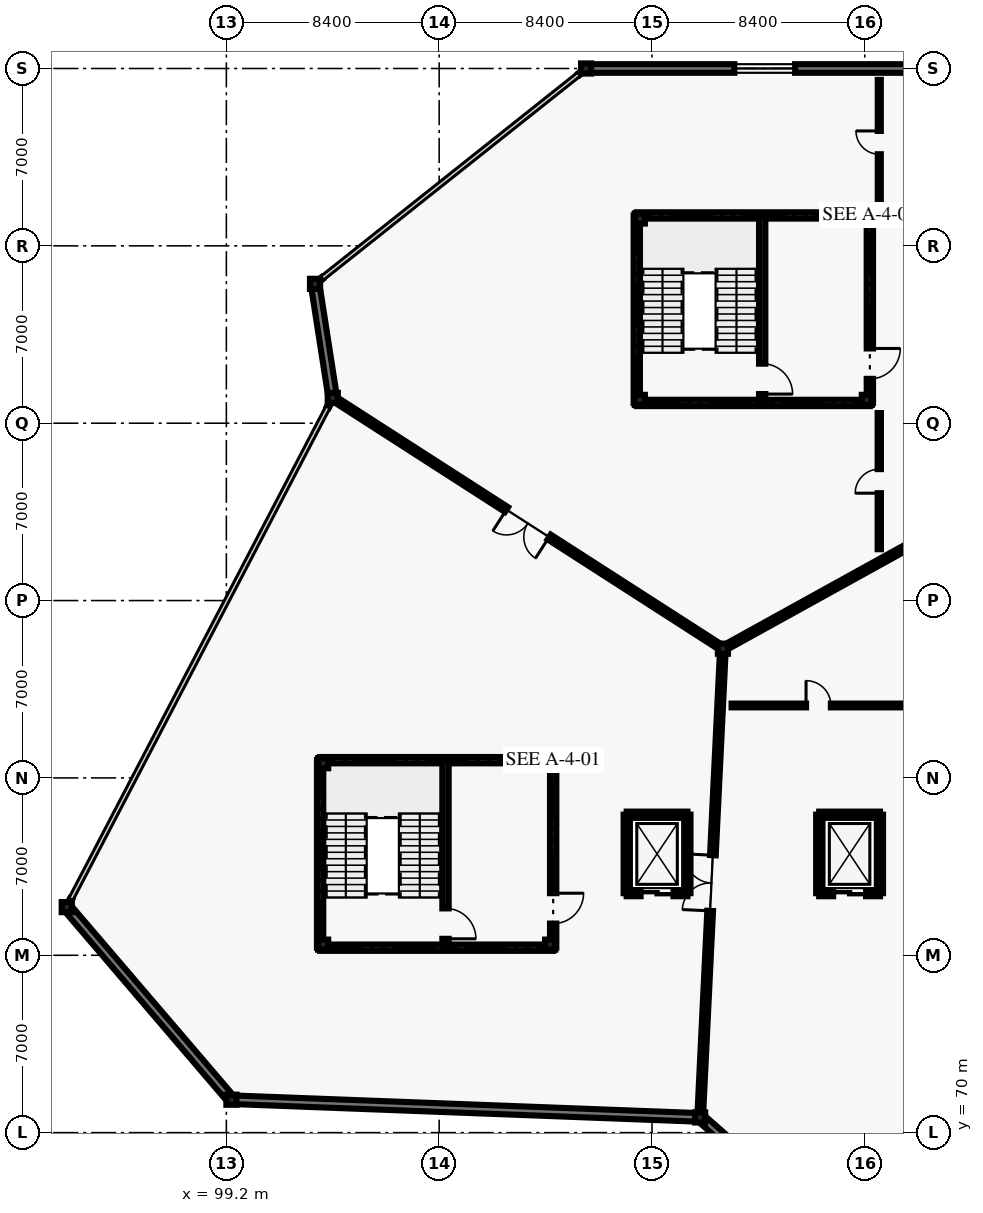
"""IFC4 building model, lengths in metres.
Left out: names, types, materials, properties, quantities, classifications, styles, units other than length and angle.
Written with IfcOpenShell. Run it as: python <this file> out.ifc"""

import sys

from ifc_helpers import new_model, si_unit, direction, frame, frame_2d, origin, origin_2d, place, context, subcontext, project, spatial, rectangle, i_section, extrude, element, fill, save


model = new_model("IFC4")
c1 = context("Model", 3, precision=1e-05, world=origin(), true_north=direction((0.0, 1.0)))
c2 = subcontext(c1, "Body", "Model", "MODEL_VIEW")
j1 = project(units=[si_unit("LENGTHUNIT", "METRE"), si_unit("PLANEANGLEUNIT", "RADIAN")], contexts=[c1])
p1 = place(None, origin())
s1 = spatial("IfcSite", under=j1, at=p1, CompositionType="ELEMENT")
p2 = place(p1, origin())
s2 = spatial("IfcBuilding", under=s1, at=p2, CompositionType="ELEMENT")
p3 = place(p2, frame((0.0, 0.0, 5.4)))
s3 = spatial("IfcBuildingStorey", under=s2, at=p3, CompositionType="ELEMENT", Elevation=5.4)
for number, where, z_axis, x_axis in (
    (1, (92.9, 78.9, 0.0), (0.0, 0.0, 1.0), (1.0, 0.0, 0.0)),
    (2, (99.4, 71.3, 0.0), (0.0, 0.0, 1.0), (1.0, 0.0, 0.0)),
    (3, (102.7, 103.5, 0.0), (0.0, 0.0, 1.0), (1.0, 0.0, 0.0)),
    (4, (103.4, 99.0, 0.0), (0.0, 0.0, 1.0), (1.0, 0.0, 0.0)),
    (5, (113.4, 112.0, 0.0), (0.0, 0.0, 1.0), (1.0, 0.0, 0.0)),
    (6, (117.9, 70.6, 0.0), (0.0, 0.0, 1.0), (1.0, 0.0, 0.0)),
    (7, (118.8, 89.1, 0.0), (0.0, 0.0, 1.0), (1.0, 0.0, 0.0)),
    (8, (103.02, 77.42, 0.0), (0.0, 0.0, 1.0), (1.0, 0.0, 0.0)),
    (9, (111.98, 77.42, 0.0), (0.0, 0.0, 1.0), (1.0, 0.0, 0.0)),
    (10, (111.98, 84.58, 0.0), (0.0, 0.0, 1.0), (1.0, 0.0, 0.0)),
    (11, (103.02, 84.58, 0.0), (0.0, 0.0, 1.0), (1.0, 0.0, 0.0)),
    (12, (115.52, 98.92, 0.0), (0.0, 0.0, 1.0), (1.0, 0.0, 0.0)),
    (13, (124.48, 98.92, 0.0), (0.0, 0.0, 1.0), (1.0, 0.0, 0.0)),
    (14, (124.48, 106.08, 0.0), (0.0, 0.0, 1.0), (1.0, 0.0, 0.0)),
    (15, (115.52, 106.08, 0.0), (0.0, 0.0, 1.0), (1.0, 0.0, 0.0)),
):
    element("IfcColumn", number, at=place(p3, frame(where, z_axis=z_axis, x_axis=x_axis)), inside=s3, PredefinedType="COLUMN", context=c2, shape_type="SweptSolid", body=[
        extrude(i_section(OverallWidth=0.4, OverallDepth=0.4, WebThickness=0.022, FlangeThickness=0.036, at=origin_2d()), origin(), (0.0, 0.0, 1.0), 4.8),
    ])
p4 = place(p3, frame((117.84, 70.602, 0.0), z_axis=(0.0, 0.0, 1.0), x_axis=(-0.999284381651, 0.037824920194, 0.0)))
e16 = element("IfcWall", 16, at=p4, inside=s3, PredefinedType="SOLIDWALL", context=c2, shape_type="SweptSolid", body=[
    extrude(rectangle(XDim=18.453, YDim=0.34, at=frame_2d((9.227, 0.0))), origin(), (0.0, 0.0, 1.0), 3.62),
])
for number, where, z_axis, x_axis in (
    (17, (92.919, 78.937, 0.0), (0.0, 0.0, 1.0), (0.464, 0.886, 0.0)),
    (18, (103.21, 98.637, 0.0), (0.0, 0.0, 1.0), (0.464, 0.886, 0.0)),
):
    element("IfcWall", number, at=place(p3, frame(where, z_axis=z_axis, x_axis=x_axis)), inside=s3, PredefinedType="SOLIDWALL", context=c2, shape_type="SweptSolid", body=[
        extrude(rectangle(XDim=0.308, YDim=0.095, at=frame_2d((0.154, 0.0))), origin(), (0.0, 0.0, 1.0), 3.62),
    ])
p5 = place(p3, frame((99.4, 71.3, 0.0), z_axis=(0.0, 0.0, 1.0), x_axis=(-0.649974737731, 0.75995581471, 0.0)))
e19 = element("IfcWall", 19, at=p5, inside=s3, PredefinedType="SOLIDWALL", context=c2, shape_type="SweptSolid", body=[
    extrude(rectangle(XDim=10.0, YDim=0.34, at=frame_2d((5.0, 0.0))), origin(), (0.0, 0.0, 1.0), 3.62),
])
p6 = place(p3, frame((125.5, 63.9, 0.0), z_axis=(0.0, 0.0, 1.0), x_axis=(-0.750131359252, 0.661288850554, 0.0)))
e20 = element("IfcWall", 20, at=p6, inside=s3, PredefinedType="SOLIDWALL", context=c2, shape_type="SweptSolid", body=[
    extrude(rectangle(XDim=10.072, YDim=0.34, at=frame_2d((5.036, 0.0))), origin(), (0.0, 0.0, 1.0), 3.62),
])
p7 = place(p3, frame((113.4, 112.0, 0.0), z_axis=(0.0, 0.0, 1.0), x_axis=(1.0, 0.0, 0.0)))
e21 = element("IfcWall", 21, at=p7, inside=s3, PredefinedType="SOLIDWALL", context=c2, shape_type="SweptSolid", body=[
    extrude(rectangle(XDim=14.1, YDim=0.34, at=frame_2d((7.05, 0.0))), origin(), (0.0, 0.0, 1.0), 3.62),
])
p8 = place(p7, frame((5.85, 0.0, 0.95)))
e22 = element("IfcOpeningElement", 22, at=p8, cuts=e21, PredefinedType="OPENING", context=c2, shape_type="SweptSolid", body=[
    extrude(rectangle(XDim=2.4, YDim=1.8, at=frame_2d((1.2, 0.9))), frame((0.0, 0.18, 0.0), z_axis=(0.0, -1.0, 0.0), x_axis=(1.0, 0.0, 0.0)), (0.0, 0.0, 1.0), 0.36),
])
p9 = place(p3, frame((102.733, 103.526, 0.0), z_axis=(0.0, 0.0, 1.0), x_axis=(0.782180115256, 0.623052379257, 0.0)))
e23 = element("IfcWall", 23, at=p9, inside=s3, PredefinedType="SOLIDWALL", context=c2, shape_type="SweptSolid", body=[
    extrude(rectangle(XDim=0.308, YDim=0.095, at=frame_2d((0.154, 0.0))), origin(), (0.0, 0.0, 1.0), 3.62),
])
p10 = place(p3, frame((113.126, 111.782, 0.0), z_axis=(0.0, 0.0, 1.0), x_axis=(0.781872503851, 0.6234383592, 0.0)))
e24 = element("IfcWall", 24, at=p10, inside=s3, PredefinedType="SOLIDWALL", context=c2, shape_type="SweptSolid", body=[
    extrude(rectangle(XDim=0.308, YDim=0.095, at=frame_2d((0.154, 0.0))), origin(), (0.0, 0.0, 1.0), 3.62),
])
p11 = place(p3, frame((103.391, 99.059, 0.0), z_axis=(0.0, 0.0, 1.0), x_axis=(-0.153783616147, 0.988104548823, 0.0)))
e25 = element("IfcWall", 25, at=p11, inside=s3, PredefinedType="SOLIDWALL", context=c2, shape_type="SweptSolid", body=[
    extrude(rectangle(XDim=4.494, YDim=0.34, at=frame_2d((2.247, 0.0))), origin(), (0.0, 0.0, 1.0), 3.62),
])
p12 = place(p3, frame((117.9, 70.6, 0.0), z_axis=(0.0, 0.0, 1.0), x_axis=(0.048599072515, 0.998818366947, 0.0)))
e26 = element("IfcWall", 26, at=p12, inside=s3, PredefinedType="SOLIDWALL", context=c2, shape_type="SweptSolid", body=[
    extrude(rectangle(XDim=18.522, YDim=0.225, at=frame_2d((9.261, 0.0))), origin(), (0.0, 0.0, 1.0), 4.02),
])
p13 = place(p12, frame((8.161, 0.0, 0.0)))
e27 = element("IfcOpeningElement", 27, at=p13, cuts=e26, PredefinedType="OPENING", context=c2, shape_type="SweptSolid", body=[
    extrude(rectangle(XDim=2.2, YDim=2.6, at=frame_2d((1.1, 1.3))), frame((0.0, 0.123, 0.0), z_axis=(0.0, -1.0, 0.0), x_axis=(1.0, 0.0, 0.0)), (0.0, 0.0, 1.0), 0.245),
])
p14 = place(p3, frame((118.8, 89.1, 0.0), z_axis=(0.0, 0.0, 1.0), x_axis=(-0.841183241423, 0.540750177392, 0.0)))
e28 = element("IfcWall", 28, at=p14, inside=s3, PredefinedType="SOLIDWALL", context=c2, shape_type="SweptSolid", body=[
    extrude(rectangle(XDim=18.308, YDim=0.225, at=frame_2d((9.154, 0.0))), origin(), (0.0, 0.0, 1.0), 4.02),
])
p15 = place(p14, frame((8.154, 0.0, 0.0)))
e29 = element("IfcOpeningElement", 29, at=p15, cuts=e28, PredefinedType="OPENING", context=c2, shape_type="SweptSolid", body=[
    extrude(rectangle(XDim=2.0, YDim=2.5, at=frame_2d((1.0, 1.25))), frame((0.0, 0.123, 0.0), z_axis=(0.0, -1.0, 0.0), x_axis=(1.0, 0.0, 0.0)), (0.0, 0.0, 1.0), 0.245),
])
p16 = place(p3, frame((134.9, 98.0, 0.0), z_axis=(0.0, 0.0, 1.0), x_axis=(-0.875181353329, -0.483794996652, 0.0)))
e30 = element("IfcWall", 30, at=p16, inside=s3, PredefinedType="SOLIDWALL", context=c2, shape_type="SweptSolid", body=[
    extrude(rectangle(XDim=18.396, YDim=0.225, at=frame_2d((9.198, 0.0))), origin(), (0.0, 0.0, 1.0), 4.02),
])
p17 = place(p16, frame((8.273, 0.0, 0.0)))
e31 = element("IfcOpeningElement", 31, at=p17, cuts=e30, PredefinedType="OPENING", context=c2, shape_type="SweptSolid", body=[
    extrude(rectangle(XDim=1.85, YDim=2.4, at=frame_2d((0.925, 1.2))), frame((0.0, 0.123, 0.0), z_axis=(0.0, -1.0, 0.0), x_axis=(1.0, 0.0, 0.0)), (0.0, 0.0, 1.0), 0.245),
])
p18 = place(p3, frame((119.142, 86.859, 0.0), z_axis=(0.0, 0.0, 1.0), x_axis=(1.0, 0.0, 0.0)))
e32 = element("IfcWall", 32, at=p18, inside=s3, PredefinedType="PARTITIONING", context=c2, shape_type="SweptSolid", body=[
    extrude(rectangle(XDim=6.858, YDim=0.15, at=frame_2d((3.429, 0.0))), origin(), (0.0, 0.0, 1.0), 3.32),
])
p19 = place(p18, frame((2.939, 0.0, 0.0)))
e33 = element("IfcOpeningElement", 33, at=p19, cuts=e32, PredefinedType="OPENING", context=c2, shape_type="SweptSolid", body=[
    extrude(rectangle(XDim=0.98, YDim=2.15, at=frame_2d((0.49, 1.075))), frame((0.0, 0.085, 0.0), z_axis=(0.0, -1.0, 0.0), x_axis=(1.0, 0.0, 0.0)), (0.0, 0.0, 1.0), 0.17),
])
p20 = place(p3, frame((124.972, 93.026, 0.0), z_axis=(0.0, 0.0, 1.0), x_axis=(0.0, 1.0, 0.0)))
e34 = element("IfcWall", 34, at=p20, inside=s3, PredefinedType="PARTITIONING", context=c2, shape_type="SweptSolid", body=[
    extrude(rectangle(XDim=5.374, YDim=0.13, at=frame_2d((2.687, 0.0))), origin(), (0.0, 0.0, 1.0), 3.32),
])
p21 = place(p20, frame((2.212, 0.0, 0.0)))
e35 = element("IfcOpeningElement", 35, at=p21, cuts=e34, PredefinedType="OPENING", context=c2, shape_type="SweptSolid", body=[
    extrude(rectangle(XDim=0.95, YDim=2.15, at=frame_2d((0.475, 1.075))), frame((0.0, 0.075, 0.0), z_axis=(0.0, -1.0, 0.0), x_axis=(1.0, 0.0, 0.0)), (0.0, 0.0, 1.0), 0.15),
])
p22 = place(p3, frame((124.972, 106.6, 0.0), z_axis=(0.0, 0.0, 1.0), x_axis=(0.0, 1.0, 0.0)))
e36 = element("IfcWall", 36, at=p22, inside=s3, PredefinedType="PARTITIONING", context=c2, shape_type="SweptSolid", body=[
    extrude(rectangle(XDim=4.95, YDim=0.12, at=frame_2d((2.475, 0.0))), origin(), (0.0, 0.0, 1.0), 3.32),
])
p23 = place(p22, frame((2.015, 0.0, 0.0)))
e37 = element("IfcOpeningElement", 37, at=p23, cuts=e36, PredefinedType="OPENING", context=c2, shape_type="SweptSolid", body=[
    extrude(rectangle(XDim=0.92, YDim=2.1, at=frame_2d((0.46, 1.05))), frame((0.0, 0.07, 0.0), z_axis=(0.0, -1.0, 0.0), x_axis=(1.0, 0.0, 0.0)), (0.0, 0.0, 1.0), 0.14),
])
p24 = place(p3, frame((102.9, 77.3, 0.0), z_axis=(0.0, 0.0, 1.0), x_axis=(0.0, 1.0, 0.0)))
e38 = element("IfcWall", 38, at=p24, inside=s3, PredefinedType="SHEAR", context=c2, shape_type="SweptSolid", body=[
    extrude(rectangle(XDim=7.4, YDim=0.25, at=frame_2d((3.7, 0.0))), origin(), (0.0, 0.0, 1.0), 4.56),
])
for number, where, z_axis, x_axis in (
    (39, (102.9, 84.7, 0.0), (0.0, 0.0, 1.0), (1.0, 0.0, 0.0)),
    (40, (112.1, 77.3, 0.0), (0.0, 0.0, 1.0), (-1.0, 0.0, 0.0)),
):
    element("IfcWall", number, at=place(p3, frame(where, z_axis=z_axis, x_axis=x_axis)), inside=s3, PredefinedType="SHEAR", context=c2, shape_type="SweptSolid", body=[
        extrude(rectangle(XDim=9.2, YDim=0.25, at=frame_2d((4.6, 0.0))), origin(), (0.0, 0.0, 1.0), 4.56),
    ])
p25 = place(p3, frame((112.1, 84.7, 0.0), z_axis=(0.0, 0.0, 1.0), x_axis=(0.0, -1.0, 0.0)))
e41 = element("IfcWall", 41, at=p25, inside=s3, PredefinedType="SHEAR", context=c2, shape_type="SweptSolid", body=[
    extrude(rectangle(XDim=7.4, YDim=0.25, at=frame_2d((3.7, 0.0))), origin(), (0.0, 0.0, 1.0), 4.56),
])
p26 = place(p25, frame((5.25, 0.0, 0.0)))
e42 = element("IfcOpeningElement", 42, at=p26, cuts=e41, PredefinedType="OPENING", context=c2, shape_type="SweptSolid", body=[
    extrude(rectangle(XDim=1.2, YDim=2.2, at=frame_2d((0.6, 1.1))), frame((0.0, 0.135, 0.0), z_axis=(0.0, -1.0, 0.0), x_axis=(1.0, 0.0, 0.0)), (0.0, 0.0, 1.0), 0.27),
])
p27 = place(p3, frame((107.85, 84.7, 0.0), z_axis=(0.0, 0.0, 1.0), x_axis=(0.0, -1.0, 0.0)))
e43 = element("IfcWall", 43, at=p27, inside=s3, PredefinedType="SHEAR", context=c2, shape_type="SweptSolid", body=[
    extrude(rectangle(XDim=7.4, YDim=0.25, at=frame_2d((3.7, 0.0))), origin(), (0.0, 0.0, 1.0), 4.56),
])
p28 = place(p27, frame((5.85, 0.0, 0.0)))
e44 = element("IfcOpeningElement", 44, at=p28, cuts=e43, PredefinedType="OPENING", context=c2, shape_type="SweptSolid", body=[
    extrude(rectangle(XDim=1.2, YDim=2.2, at=frame_2d((0.6, 1.1))), frame((0.0, 0.135, 0.0), z_axis=(0.0, -1.0, 0.0), x_axis=(1.0, 0.0, 0.0)), (0.0, 0.0, 1.0), 0.27),
])
p29 = place(p3, frame((115.4, 98.8, 0.0), z_axis=(0.0, 0.0, 1.0), x_axis=(0.0, 1.0, 0.0)))
e45 = element("IfcWall", 45, at=p29, inside=s3, PredefinedType="SHEAR", context=c2, shape_type="SweptSolid", body=[
    extrude(rectangle(XDim=7.4, YDim=0.25, at=frame_2d((3.7, 0.0))), origin(), (0.0, 0.0, 1.0), 4.56),
])
for number, where, z_axis, x_axis in (
    (46, (115.4, 106.2, 0.0), (0.0, 0.0, 1.0), (1.0, 0.0, 0.0)),
    (47, (124.6, 98.8, 0.0), (0.0, 0.0, 1.0), (-1.0, 0.0, 0.0)),
):
    element("IfcWall", number, at=place(p3, frame(where, z_axis=z_axis, x_axis=x_axis)), inside=s3, PredefinedType="SHEAR", context=c2, shape_type="SweptSolid", body=[
        extrude(rectangle(XDim=9.2, YDim=0.25, at=frame_2d((4.6, 0.0))), origin(), (0.0, 0.0, 1.0), 4.56),
    ])
p30 = place(p3, frame((124.6, 106.2, 0.0), z_axis=(0.0, 0.0, 1.0), x_axis=(0.0, -1.0, 0.0)))
e48 = element("IfcWall", 48, at=p30, inside=s3, PredefinedType="SHEAR", context=c2, shape_type="SweptSolid", body=[
    extrude(rectangle(XDim=7.4, YDim=0.25, at=frame_2d((3.7, 0.0))), origin(), (0.0, 0.0, 1.0), 4.56),
])
p31 = place(p30, frame((5.25, 0.0, 0.0)))
e49 = element("IfcOpeningElement", 49, at=p31, cuts=e48, PredefinedType="OPENING", context=c2, shape_type="SweptSolid", body=[
    extrude(rectangle(XDim=1.2, YDim=2.2, at=frame_2d((0.6, 1.1))), frame((0.0, 0.135, 0.0), z_axis=(0.0, -1.0, 0.0), x_axis=(1.0, 0.0, 0.0)), (0.0, 0.0, 1.0), 0.27),
])
p32 = place(p3, frame((120.35, 106.2, 0.0), z_axis=(0.0, 0.0, 1.0), x_axis=(0.0, -1.0, 0.0)))
e50 = element("IfcWall", 50, at=p32, inside=s3, PredefinedType="SHEAR", context=c2, shape_type="SweptSolid", body=[
    extrude(rectangle(XDim=7.4, YDim=0.25, at=frame_2d((3.7, 0.0))), origin(), (0.0, 0.0, 1.0), 4.56),
])
p33 = place(p32, frame((5.85, 0.0, 0.0)))
e51 = element("IfcOpeningElement", 51, at=p33, cuts=e50, PredefinedType="OPENING", context=c2, shape_type="SweptSolid", body=[
    extrude(rectangle(XDim=1.2, YDim=2.2, at=frame_2d((0.6, 1.1))), frame((0.0, 0.135, 0.0), z_axis=(0.0, -1.0, 0.0), x_axis=(1.0, 0.0, 0.0)), (0.0, 0.0, 1.0), 0.27),
])
p34 = place(p3, frame((115.0, 82.55, 0.0), z_axis=(0.0, 0.0, 1.0), x_axis=(1.0, 0.0, 0.0)))
e52 = element("IfcWall", 52, at=p34, inside=s3, PredefinedType="SHEAR", context=c2, shape_type="SweptSolid", body=[
    extrude(rectangle(XDim=2.4, YDim=0.24, at=frame_2d((1.2, 0.0))), origin(), (0.0, 0.0, 1.0), 4.56),
])
for number, where, z_axis, x_axis in (
    (53, (117.4, 82.55, 0.0), (0.0, 0.0, 1.0), (0.0, -1.0, 0.0)),
    (54, (115.0, 79.45, 0.0), (0.0, 0.0, 1.0), (0.0, 1.0, 0.0)),
):
    element("IfcWall", number, at=place(p3, frame(where, z_axis=z_axis, x_axis=x_axis)), inside=s3, PredefinedType="SHEAR", context=c2, shape_type="SweptSolid", body=[
        extrude(rectangle(XDim=3.1, YDim=0.24, at=frame_2d((1.55, 0.0))), origin(), (0.0, 0.0, 1.0), 4.56),
    ])
p35 = place(p3, frame((117.4, 79.45, 0.0), z_axis=(0.0, 0.0, 1.0), x_axis=(-1.0, 0.0, 0.0)))
e55 = element("IfcWall", 55, at=p35, inside=s3, PredefinedType="SHEAR", context=c2, shape_type="SweptSolid", body=[
    extrude(rectangle(XDim=2.4, YDim=0.24, at=frame_2d((1.2, 0.0))), origin(), (0.0, 0.0, 1.0), 4.56),
])
p36 = place(p35, frame((0.55, 0.0, 0.0)))
e56 = element("IfcOpeningElement", 56, at=p36, cuts=e55, PredefinedType="OPENING", context=c2, shape_type="SweptSolid", body=[
    extrude(rectangle(XDim=1.3, YDim=2.25, at=frame_2d((0.65, 1.125))), frame((0.0, 0.13, 0.0), z_axis=(0.0, -1.0, 0.0), x_axis=(1.0, 0.0, 0.0)), (0.0, 0.0, 1.0), 0.26),
])
p37 = place(p3, frame((122.6, 82.55, 0.0), z_axis=(0.0, 0.0, 1.0), x_axis=(1.0, 0.0, 0.0)))
e57 = element("IfcWall", 57, at=p37, inside=s3, PredefinedType="SHEAR", context=c2, shape_type="SweptSolid", body=[
    extrude(rectangle(XDim=2.4, YDim=0.24, at=frame_2d((1.2, 0.0))), origin(), (0.0, 0.0, 1.0), 4.56),
])
for number, where, z_axis, x_axis in (
    (58, (125.0, 82.55, 0.0), (0.0, 0.0, 1.0), (0.0, -1.0, 0.0)),
    (59, (122.6, 79.45, 0.0), (0.0, 0.0, 1.0), (0.0, 1.0, 0.0)),
):
    element("IfcWall", number, at=place(p3, frame(where, z_axis=z_axis, x_axis=x_axis)), inside=s3, PredefinedType="SHEAR", context=c2, shape_type="SweptSolid", body=[
        extrude(rectangle(XDim=3.1, YDim=0.24, at=frame_2d((1.55, 0.0))), origin(), (0.0, 0.0, 1.0), 4.56),
    ])
p38 = place(p3, frame((125.0, 79.45, 0.0), z_axis=(0.0, 0.0, 1.0), x_axis=(-1.0, 0.0, 0.0)))
e60 = element("IfcWall", 60, at=p38, inside=s3, PredefinedType="SHEAR", context=c2, shape_type="SweptSolid", body=[
    extrude(rectangle(XDim=2.4, YDim=0.24, at=frame_2d((1.2, 0.0))), origin(), (0.0, 0.0, 1.0), 4.56),
])
p39 = place(p38, frame((0.55, 0.0, 0.0)))
e61 = element("IfcOpeningElement", 61, at=p39, cuts=e60, PredefinedType="OPENING", context=c2, shape_type="SweptSolid", body=[
    extrude(rectangle(XDim=1.3, YDim=2.25, at=frame_2d((0.65, 1.125))), frame((0.0, 0.13, 0.0), z_axis=(0.0, -1.0, 0.0), x_axis=(1.0, 0.0, 0.0)), (0.0, 0.0, 1.0), 0.26),
])
p40 = place(p8, origin())
e62 = element("IfcWindow", 62, at=p40, inside=s3, PartitioningType="SINGLE_PANEL", PredefinedType="WINDOW", context=c2, shape_type="SweptSolid", body=[
    extrude(rectangle(XDim=2.4, YDim=1.8, at=frame_2d((1.2, 0.9))), frame((0.0, 0.03, 0.0), z_axis=(0.0, -1.0, 0.0), x_axis=(1.0, 0.0, 0.0)), (0.0, 0.0, 1.0), 0.06),
])
fill(e22, e62)
p41 = place(p13, origin())
e63 = element("IfcDoor", 63, at=p41, inside=s3, OperationType="DOUBLE_DOOR_SINGLE_SWING", PredefinedType="DOOR", context=c2, shape_type="SweptSolid", body=[
    extrude(rectangle(XDim=2.2, YDim=2.6, at=frame_2d((1.1, 1.3))), frame((0.0, 0.025, 0.0), z_axis=(0.0, -1.0, 0.0), x_axis=(1.0, 0.0, 0.0)), (0.0, 0.0, 1.0), 0.05),
])
fill(e27, e63)
p42 = place(p15, origin())
e64 = element("IfcDoor", 64, at=p42, inside=s3, OperationType="DOUBLE_DOOR_SINGLE_SWING", PredefinedType="DOOR", context=c2, shape_type="SweptSolid", body=[
    extrude(rectangle(XDim=2.0, YDim=2.5, at=frame_2d((1.0, 1.25))), frame((0.0, 0.025, 0.0), z_axis=(0.0, -1.0, 0.0), x_axis=(1.0, 0.0, 0.0)), (0.0, 0.0, 1.0), 0.05),
])
fill(e29, e64)
p43 = place(p19, origin())
e65 = element("IfcDoor", 65, at=p43, inside=s3, OperationType="SINGLE_SWING_LEFT", PredefinedType="DOOR", context=c2, shape_type="SweptSolid", body=[
    extrude(rectangle(XDim=0.98, YDim=2.15, at=frame_2d((0.49, 1.075))), frame((0.0, 0.025, 0.0), z_axis=(0.0, -1.0, 0.0), x_axis=(1.0, 0.0, 0.0)), (0.0, 0.0, 1.0), 0.05),
])
fill(e33, e65)
p44 = place(p21, origin())
e66 = element("IfcDoor", 66, at=p44, inside=s3, OperationType="SINGLE_SWING_LEFT", PredefinedType="DOOR", context=c2, shape_type="SweptSolid", body=[
    extrude(rectangle(XDim=0.95, YDim=2.15, at=frame_2d((0.475, 1.075))), frame((0.0, 0.025, 0.0), z_axis=(0.0, -1.0, 0.0), x_axis=(1.0, 0.0, 0.0)), (0.0, 0.0, 1.0), 0.05),
])
fill(e35, e66)
p45 = place(p23, origin())
e67 = element("IfcDoor", 67, at=p45, inside=s3, OperationType="SINGLE_SWING_RIGHT", PredefinedType="DOOR", context=c2, shape_type="SweptSolid", body=[
    extrude(rectangle(XDim=0.92, YDim=2.1, at=frame_2d((0.46, 1.05))), frame((0.0, 0.025, 0.0), z_axis=(0.0, -1.0, 0.0), x_axis=(1.0, 0.0, 0.0)), (0.0, 0.0, 1.0), 0.05),
])
fill(e37, e67)
p46 = place(p26, origin())
e68 = element("IfcDoor", 68, at=p46, inside=s3, OperationType="SINGLE_SWING_LEFT", PredefinedType="DOOR", context=c2, shape_type="SweptSolid", body=[
    extrude(rectangle(XDim=1.2, YDim=2.2, at=frame_2d((0.6, 1.1))), frame((0.0, 0.025, 0.0), z_axis=(0.0, -1.0, 0.0), x_axis=(1.0, 0.0, 0.0)), (0.0, 0.0, 1.0), 0.05),
])
fill(e42, e68)
p47 = place(p28, origin())
e69 = element("IfcDoor", 69, at=p47, inside=s3, OperationType="SINGLE_SWING_RIGHT", PredefinedType="DOOR", context=c2, shape_type="SweptSolid", body=[
    extrude(rectangle(XDim=1.2, YDim=2.2, at=frame_2d((0.6, 1.1))), frame((0.0, 0.025, 0.0), z_axis=(0.0, -1.0, 0.0), x_axis=(1.0, 0.0, 0.0)), (0.0, 0.0, 1.0), 0.05),
])
fill(e44, e69)
p48 = place(p31, origin())
e70 = element("IfcDoor", 70, at=p48, inside=s3, OperationType="SINGLE_SWING_LEFT", PredefinedType="DOOR", context=c2, shape_type="SweptSolid", body=[
    extrude(rectangle(XDim=1.2, YDim=2.2, at=frame_2d((0.6, 1.1))), frame((0.0, 0.025, 0.0), z_axis=(0.0, -1.0, 0.0), x_axis=(1.0, 0.0, 0.0)), (0.0, 0.0, 1.0), 0.05),
])
fill(e49, e70)
p49 = place(p33, origin())
e71 = element("IfcDoor", 71, at=p49, inside=s3, OperationType="SINGLE_SWING_RIGHT", PredefinedType="DOOR", context=c2, shape_type="SweptSolid", body=[
    extrude(rectangle(XDim=1.2, YDim=2.2, at=frame_2d((0.6, 1.1))), frame((0.0, 0.025, 0.0), z_axis=(0.0, -1.0, 0.0), x_axis=(1.0, 0.0, 0.0)), (0.0, 0.0, 1.0), 0.05),
])
fill(e51, e71)
p50 = place(p36, origin())
e72 = element("IfcDoor", 72, at=p50, inside=s3, OperationType="SLIDING_TO_LEFT", PredefinedType="DOOR", context=c2, shape_type="SweptSolid", body=[
    extrude(rectangle(XDim=1.3, YDim=2.25, at=frame_2d((0.65, 1.125))), frame((0.0, 0.025, 0.0), z_axis=(0.0, -1.0, 0.0), x_axis=(1.0, 0.0, 0.0)), (0.0, 0.0, 1.0), 0.05),
])
fill(e56, e72)
p51 = place(p39, origin())
e73 = element("IfcDoor", 73, at=p51, inside=s3, OperationType="SLIDING_TO_LEFT", PredefinedType="DOOR", context=c2, shape_type="SweptSolid", body=[
    extrude(rectangle(XDim=1.3, YDim=2.25, at=frame_2d((0.65, 1.125))), frame((0.0, 0.025, 0.0), z_axis=(0.0, -1.0, 0.0), x_axis=(1.0, 0.0, 0.0)), (0.0, 0.0, 1.0), 0.05),
])
fill(e61, e73)
save(model, sys.argv[1])
